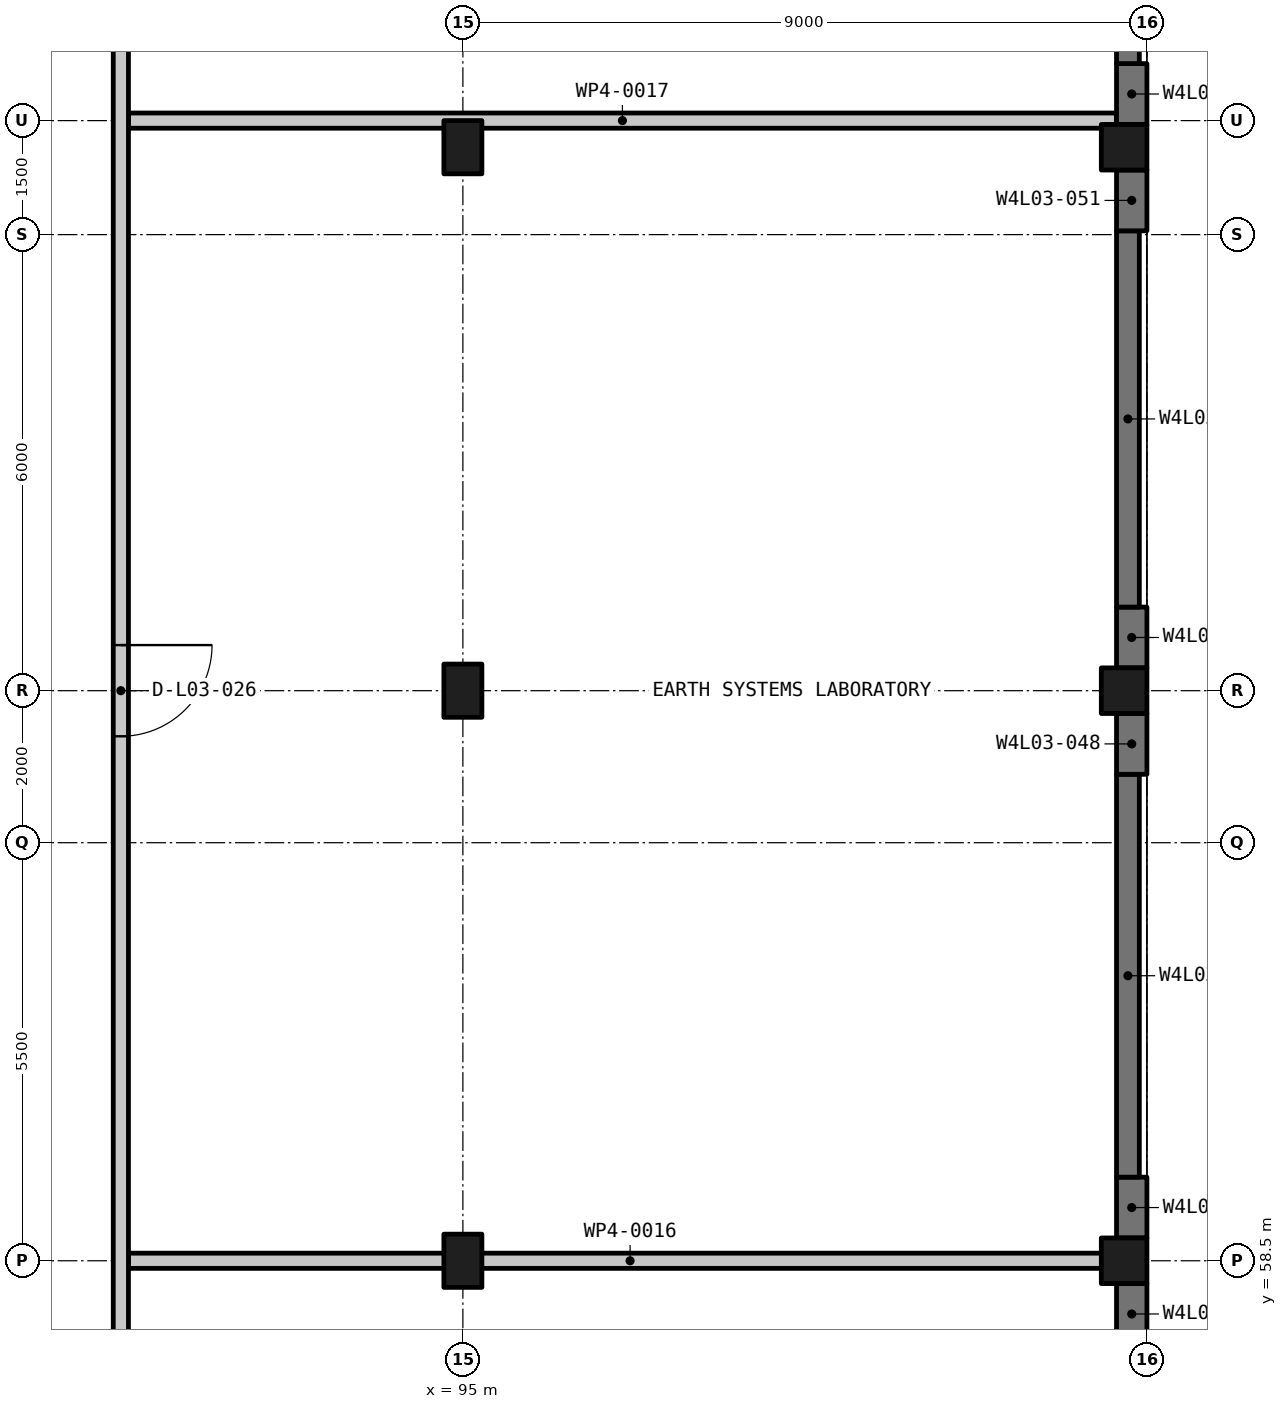
"""IFC4 building model, lengths in metres.
Left out: names, types, materials, properties, quantities, classifications, styles, units other than length and angle.
Written with IfcOpenShell. Run it as: python <this file> out.ifc"""

import sys

from ifc_helpers import new_model, si_unit, direction, frame, frame_2d, origin, origin_2d, place, context, subcontext, project, spatial, rectangle, extrude, element, fill, save


model = new_model("IFC4")
c1 = context("Model", 3, precision=1e-05, world=origin(), true_north=direction((0.0, 1.0)))
c2 = subcontext(c1, "Body", "Model", "MODEL_VIEW")
j1 = project(units=[si_unit("LENGTHUNIT", "METRE"), si_unit("PLANEANGLEUNIT", "RADIAN")], contexts=[c1])
p1 = place(None, origin())
s1 = spatial("IfcSite", under=j1, at=p1, CompositionType="ELEMENT")
p2 = place(p1, origin())
s2 = spatial("IfcBuilding", under=s1, at=p2, CompositionType="ELEMENT")
p3 = place(p2, frame((0.0, 0.0, 15.75)))
s3 = spatial("IfcBuildingStorey", under=s2, at=p3, CompositionType="ELEMENT", Elevation=15.75)
for number, where, z_axis, x_axis in (
    (1, (95.0, 58.5, -0.3), (0.0, 0.0, 1.0), (1.0, 0.0, 0.0)),
    (2, (95.0, 66.0, -0.3), (0.0, 0.0, 1.0), (1.0, 0.0, 0.0)),
    (3, (95.0, 73.15, -0.3), (0.0, 0.0, 1.0), (1.0, 0.0, 0.0)),
):
    element("IfcColumn", number, at=place(p3, frame(where, z_axis=z_axis, x_axis=x_axis)), inside=s3, PredefinedType="COLUMN", context=c2, shape_type="SweptSolid", body=[
        extrude(rectangle(XDim=0.5, YDim=0.7, at=origin_2d()), origin(), (0.0, 0.0, 1.0), 4.5),
    ])
for number, where, z_axis, x_axis in (
    (4, (103.7, 58.5, -0.3), (0.0, 0.0, 1.0), (1.0, 0.0, 0.0)),
    (5, (103.7, 66.0, -0.3), (0.0, 0.0, 1.0), (1.0, 0.0, 0.0)),
    (6, (103.7, 73.15, -0.3), (0.0, 0.0, 1.0), (1.0, 0.0, 0.0)),
):
    element("IfcColumn", number, at=place(p3, frame(where, z_axis=z_axis, x_axis=x_axis)), inside=s3, PredefinedType="COLUMN", context=c2, shape_type="SweptSolid", body=[
        extrude(rectangle(XDim=0.6, YDim=0.6, at=origin_2d()), origin(), (0.0, 0.0, 1.0), 4.5),
    ])
for number, where, z_axis, x_axis in (
    (7, (103.8, 57.4, -0.3), (0.0, 0.0, 1.0), (0.0, 1.0, 0.0)),
    (8, (103.8, 58.8, -0.3), (0.0, 0.0, 1.0), (0.0, 1.0, 0.0)),
):
    element("IfcWall", number, at=place(p3, frame(where, z_axis=z_axis, x_axis=x_axis)), inside=s3, PredefinedType="SOLIDWALL", context=c2, shape_type="SweptSolid", body=[
        extrude(rectangle(XDim=0.8, YDim=0.4, at=frame_2d((0.4, 0.0))), origin(), (0.0, 0.0, 1.0), 4.5),
    ])
p4 = place(p3, frame((103.75, 59.6, -0.3), z_axis=(0.0, 0.0, 1.0), x_axis=(0.0, 1.0, 0.0)))
e9 = element("IfcWall", 9, at=p4, inside=s3, PredefinedType="SOLIDWALL", context=c2, shape_type="SweptSolid", body=[
    extrude(rectangle(XDim=5.3, YDim=0.3, at=frame_2d((2.65, 0.0))), origin(), (0.0, 0.0, 1.0), 4.5),
])
for number, where, z_axis, x_axis in (
    (10, (103.8, 64.9, -0.3), (0.0, 0.0, 1.0), (0.0, 1.0, 0.0)),
    (11, (103.8, 66.3, -0.3), (0.0, 0.0, 1.0), (0.0, 1.0, 0.0)),
):
    element("IfcWall", number, at=place(p3, frame(where, z_axis=z_axis, x_axis=x_axis)), inside=s3, PredefinedType="SOLIDWALL", context=c2, shape_type="SweptSolid", body=[
        extrude(rectangle(XDim=0.8, YDim=0.4, at=frame_2d((0.4, 0.0))), origin(), (0.0, 0.0, 1.0), 4.5),
    ])
p5 = place(p3, frame((103.75, 67.1, -0.3), z_axis=(0.0, 0.0, 1.0), x_axis=(0.0, 1.0, 0.0)))
e12 = element("IfcWall", 12, at=p5, inside=s3, PredefinedType="SOLIDWALL", context=c2, shape_type="SweptSolid", body=[
    extrude(rectangle(XDim=4.95, YDim=0.3, at=frame_2d((2.475, 0.0))), origin(), (0.0, 0.0, 1.0), 4.5),
])
for number, where, z_axis, x_axis in (
    (13, (103.8, 72.05, -0.3), (0.0, 0.0, 1.0), (0.0, 1.0, 0.0)),
    (14, (103.8, 73.45, -0.3), (0.0, 0.0, 1.0), (0.0, 1.0, 0.0)),
):
    element("IfcWall", number, at=place(p3, frame(where, z_axis=z_axis, x_axis=x_axis)), inside=s3, PredefinedType="SOLIDWALL", context=c2, shape_type="SweptSolid", body=[
        extrude(rectangle(XDim=0.8, YDim=0.4, at=frame_2d((0.4, 0.0))), origin(), (0.0, 0.0, 1.0), 4.5),
    ])
p6 = place(p3, frame((103.75, 74.25, -0.3), z_axis=(0.0, 0.0, 1.0), x_axis=(0.0, 1.0, 0.0)))
e15 = element("IfcWall", 15, at=p6, inside=s3, PredefinedType="SOLIDWALL", context=c2, shape_type="SweptSolid", body=[
    extrude(rectangle(XDim=5.3, YDim=0.3, at=frame_2d((2.65, 0.0))), origin(), (0.0, 0.0, 1.0), 4.5),
])
p7 = place(p3, frame((90.6, 58.5, 0.0), z_axis=(0.0, 0.0, 1.0), x_axis=(1.0, 0.0, 0.0)))
e16 = element("IfcWall", 16, at=p7, inside=s3, PredefinedType="PARTITIONING", context=c2, shape_type="SweptSolid", body=[
    extrude(rectangle(XDim=13.2, YDim=0.2, at=frame_2d((6.6, 0.0))), origin(), (0.0, 0.0, 1.0), 3.3),
])
p8 = place(p3, frame((90.6, 73.5, 0.0), z_axis=(0.0, 0.0, 1.0), x_axis=(1.0, 0.0, 0.0)))
e17 = element("IfcWall", 17, at=p8, inside=s3, PredefinedType="PARTITIONING", context=c2, shape_type="SweptSolid", body=[
    extrude(rectangle(XDim=12.998, YDim=0.2, at=frame_2d((6.499, 0.0))), origin(), (0.0, 0.0, 1.0), 3.4),
])
p9 = place(p3, frame((90.5, 80.8, 0.0), z_axis=(0.0, 0.0, 1.0), x_axis=(0.0, -1.0, 0.0)))
e18 = element("IfcWall", 18, at=p9, inside=s3, PredefinedType="PARTITIONING", context=c2, shape_type="SweptSolid", body=[
    extrude(rectangle(XDim=74.6, YDim=0.2, at=frame_2d((37.3, 0.0))), origin(), (0.0, 0.0, 1.0), 3.3),
])
p10 = place(p9, frame((70.35, 0.0, 0.0)))
e19 = element("IfcOpeningElement", 19, at=p10, cuts=e18, PredefinedType="OPENING", context=c2, shape_type="SweptSolid", body=[
    extrude(rectangle(XDim=1.2, YDim=2.1, at=frame_2d((0.6, 1.05))), frame((0.0, 0.11, 0.0), z_axis=(0.0, -1.0, 0.0), x_axis=(1.0, 0.0, 0.0)), (0.0, 0.0, 1.0), 0.22),
])
p11 = place(p9, frame((59.2, 0.0, 0.0)))
e20 = element("IfcOpeningElement", 20, at=p11, cuts=e18, PredefinedType="OPENING", context=c2, shape_type="SweptSolid", body=[
    extrude(rectangle(XDim=1.2, YDim=2.1, at=frame_2d((0.6, 1.05))), frame((0.0, 0.11, 0.0), z_axis=(0.0, -1.0, 0.0), x_axis=(1.0, 0.0, 0.0)), (0.0, 0.0, 1.0), 0.22),
])
p12 = place(p9, frame((44.2, 0.0, 0.0)))
e21 = element("IfcOpeningElement", 21, at=p12, cuts=e18, PredefinedType="OPENING", context=c2, shape_type="SweptSolid", body=[
    extrude(rectangle(XDim=1.2, YDim=2.1, at=frame_2d((0.6, 1.05))), frame((0.0, 0.11, 0.0), z_axis=(0.0, -1.0, 0.0), x_axis=(1.0, 0.0, 0.0)), (0.0, 0.0, 1.0), 0.22),
])
p13 = place(p9, frame((35.199, 0.0, 0.0)))
e22 = element("IfcOpeningElement", 22, at=p13, cuts=e18, PredefinedType="OPENING", context=c2, shape_type="SweptSolid", body=[
    extrude(rectangle(XDim=1.2, YDim=2.1, at=frame_2d((0.6, 1.05))), frame((0.0, 0.11, 0.0), z_axis=(0.0, -1.0, 0.0), x_axis=(1.0, 0.0, 0.0)), (0.0, 0.0, 1.0), 0.22),
])
p14 = place(p9, frame((14.2, 0.0, 0.0)))
e23 = element("IfcOpeningElement", 23, at=p14, cuts=e18, PredefinedType="OPENING", context=c2, shape_type="SweptSolid", body=[
    extrude(rectangle(XDim=1.2, YDim=2.1, at=frame_2d((0.6, 1.05))), frame((0.0, 0.11, 0.0), z_axis=(0.0, -1.0, 0.0), x_axis=(1.0, 0.0, 0.0)), (0.0, 0.0, 1.0), 0.22),
])
p15 = place(p9, frame((3.075, 0.0, 0.0)))
e24 = element("IfcOpeningElement", 24, at=p15, cuts=e18, PredefinedType="OPENING", context=c2, shape_type="SweptSolid", body=[
    extrude(rectangle(XDim=1.2, YDim=2.1, at=frame_2d((0.6, 1.05))), frame((0.0, 0.11, 0.0), z_axis=(0.0, -1.0, 0.0), x_axis=(1.0, 0.0, 0.0)), (0.0, 0.0, 1.0), 0.22),
])
p16 = place(p14, origin())
e25 = element("IfcDoor", 25, at=p16, inside=s3, OperationType="SINGLE_SWING_RIGHT", PredefinedType="DOOR", context=c2, shape_type="SweptSolid", body=[
    extrude(rectangle(XDim=1.2, YDim=2.1, at=frame_2d((0.6, 1.05))), frame((0.0, 0.025, 0.0), z_axis=(0.0, -1.0, 0.0), x_axis=(1.0, 0.0, 0.0)), (0.0, 0.0, 1.0), 0.05),
])
fill(e23, e25)
save(model, sys.argv[1])
